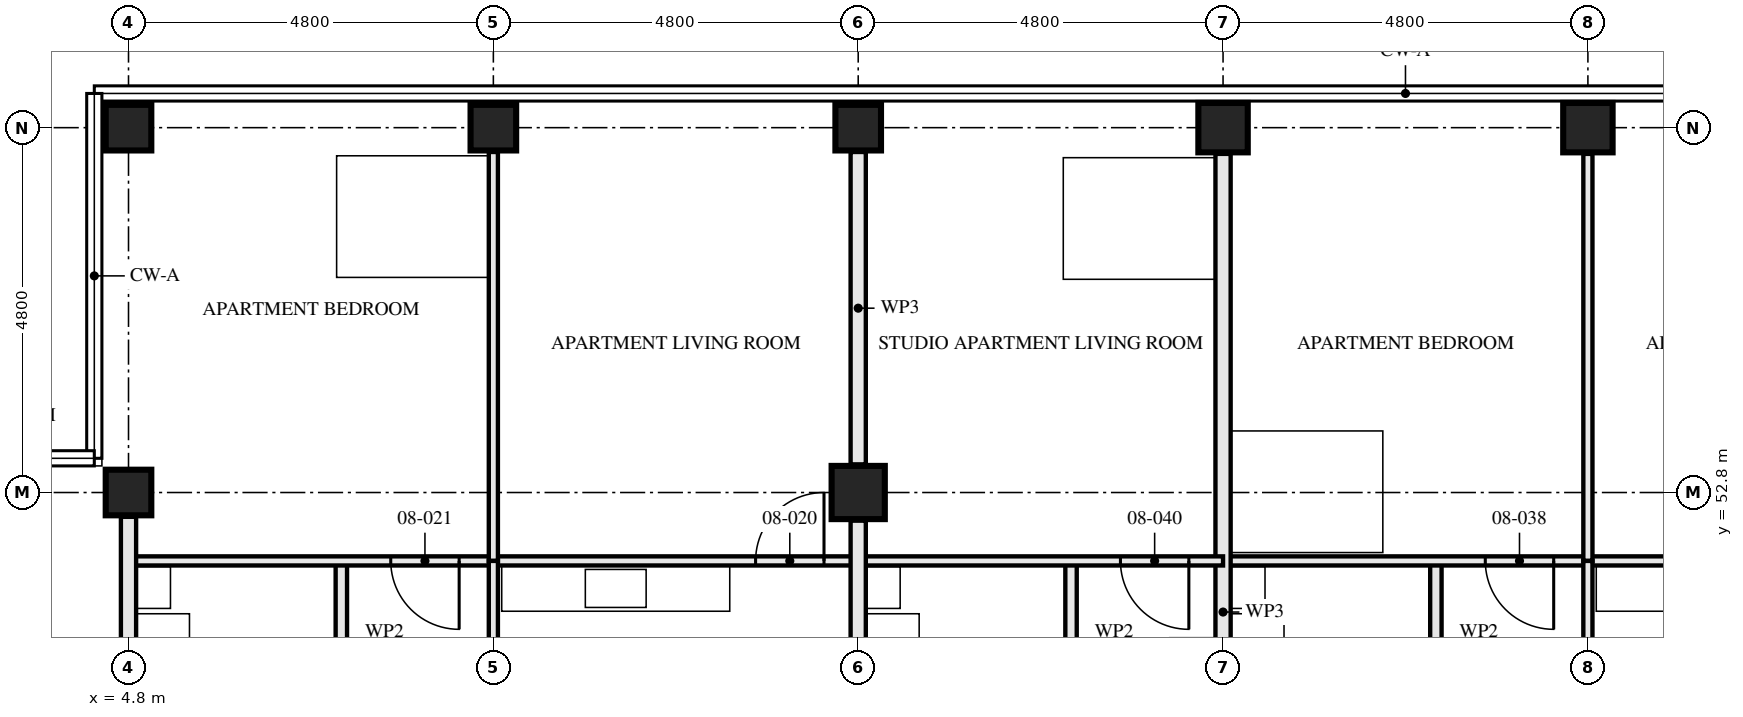
"""IFC4 building model, lengths in metres.
Left out: names, types, materials, properties, quantities, classifications, styles, units other than length and angle.
Written with IfcOpenShell. Run it as: python <this file> out.ifc"""

import sys

from ifc_helpers import new_model, si_unit, direction, frame, frame_2d, origin, origin_2d, place, context, subcontext, project, spatial, rectangle, hollow_rectangle, extrude, element, fill, save


model = new_model("IFC4")
c1 = context("Model", 3, precision=1e-05, world=origin(), true_north=direction((0.0, 1.0)))
c2 = subcontext(c1, "Body", "Model", "MODEL_VIEW")
j1 = project(units=[si_unit("LENGTHUNIT", "METRE"), si_unit("PLANEANGLEUNIT", "RADIAN")], contexts=[c1])
p1 = place(None, origin())
s1 = spatial("IfcSite", under=j1, at=p1, CompositionType="ELEMENT")
p2 = place(p1, origin())
s2 = spatial("IfcBuilding", under=s1, at=p2, CompositionType="ELEMENT")
p3 = place(p2, frame((0.0, 0.0, 34.0)))
s3 = spatial("IfcBuildingStorey", under=s2, at=p3, CompositionType="ELEMENT", Elevation=34.0)
for number, where, z_axis, x_axis in (
    (1, (4.8, 52.8, 0.0), (0.0, 0.0, 1.0), (0.0, 1.0, 0.0)),
    (2, (4.8, 57.6, 0.0), (0.0, 0.0, 1.0), (0.0, 1.0, 0.0)),
    (3, (9.6, 57.6, 0.0), (0.0, 0.0, 1.0), (0.0, 1.0, 0.0)),
):
    element("IfcColumn", number, at=place(p3, frame(where, z_axis=z_axis, x_axis=x_axis)), inside=s3, PredefinedType="COLUMN", context=c2, shape_type="SweptSolid", body=[
        extrude(hollow_rectangle(XDim=0.6, YDim=0.6, WallThickness=0.08, at=origin_2d()), origin(), (0.0, 0.0, 1.0), 3.5),
    ])
p4 = place(p3, frame((14.4, 52.8, 0.0), z_axis=(0.0, 0.0, 1.0), x_axis=(1.0, 0.0, 0.0)))
e4 = element("IfcColumn", 4, at=p4, inside=s3, PredefinedType="COLUMN", context=c2, shape_type="SweptSolid", body=[
    extrude(hollow_rectangle(XDim=0.7, YDim=0.7, WallThickness=0.06, at=origin_2d()), origin(), (0.0, 0.0, 1.0), 3.5),
])
p5 = place(p3, frame((14.4, 57.6, 0.0), z_axis=(0.0, 0.0, 1.0), x_axis=(0.0, 1.0, 0.0)))
e5 = element("IfcColumn", 5, at=p5, inside=s3, PredefinedType="COLUMN", context=c2, shape_type="SweptSolid", body=[
    extrude(hollow_rectangle(XDim=0.6, YDim=0.6, WallThickness=0.08, at=origin_2d()), origin(), (0.0, 0.0, 1.0), 3.5),
])
for number, where, z_axis, x_axis in (
    (6, (19.2, 57.6, 0.0), (0.0, 0.0, 1.0), (0.0, 1.0, 0.0)),
    (7, (24.0, 57.6, 0.0), (0.0, 0.0, 1.0), (0.0, 1.0, 0.0)),
):
    element("IfcColumn", number, at=place(p3, frame(where, z_axis=z_axis, x_axis=x_axis)), inside=s3, PredefinedType="COLUMN", context=c2, shape_type="SweptSolid", body=[
        extrude(hollow_rectangle(XDim=0.65, YDim=0.65, WallThickness=0.08, at=origin_2d()), origin(), (0.0, 0.0, 1.0), 3.5),
    ])
p6 = place(p3, frame((7.6, 51.9, 0.0), z_axis=(0.0, 0.0, 1.0), x_axis=(0.0, -1.0, 0.0)))
e8 = element("IfcWall", 8, at=p6, inside=s3, PredefinedType="PARTITIONING", context=c2, shape_type="SweptSolid", body=[
    extrude(rectangle(XDim=3.0, YDim=0.15, at=frame_2d((1.5, 0.0))), origin(), (0.0, 0.0, 1.0), 3.33),
])
p7 = place(p6, frame((1.05, 0.0, 0.0)))
e9 = element("IfcOpeningElement", 9, at=p7, cuts=e8, PredefinedType="OPENING", context=c2, shape_type="SweptSolid", body=[
    extrude(rectangle(XDim=0.9, YDim=2.1, at=frame_2d((0.45, 1.05))), frame((0.0, 0.085, 0.0), z_axis=(0.0, -1.0, 0.0), x_axis=(1.0, 0.0, 0.0)), (0.0, 0.0, 1.0), 0.171),
])
p8 = place(p3, frame((9.6, 51.9, 0.0), z_axis=(0.0, 0.0, 1.0), x_axis=(0.0, -1.0, 0.0)))
e10 = element("IfcWall", 10, at=p8, inside=s3, PredefinedType="PARTITIONING", context=c2, shape_type="SweptSolid", body=[
    extrude(rectangle(XDim=6.75, YDim=0.12, at=frame_2d((3.375, 0.0))), origin(), (0.0, 0.0, 1.0), 2.55),
])
p9 = place(p8, frame((2.925, 0.0, 0.0)))
e11 = element("IfcOpeningElement", 11, at=p9, cuts=e10, PredefinedType="OPENING", context=c2, shape_type="SweptSolid", body=[
    extrude(rectangle(XDim=0.9, YDim=2.1, at=frame_2d((0.45, 1.05))), frame((0.0, 0.071, 0.0), z_axis=(0.0, -1.0, 0.0), x_axis=(1.0, 0.0, 0.0)), (0.0, 0.0, 1.0), 0.141),
])
p10 = place(p3, frame((14.4, 51.9, 0.0), z_axis=(0.0, 0.0, 1.0), x_axis=(-1.0, 0.0, 0.0)))
e12 = element("IfcWall", 12, at=p10, inside=s3, PredefinedType="PARTITIONING", context=c2, shape_type="SweptSolid", body=[
    extrude(rectangle(XDim=4.8, YDim=0.12, at=frame_2d((2.4, 0.0))), origin(), (0.0, 0.0, 1.0), 3.33),
])
p11 = place(p10, frame((0.45, 0.0, 0.0)))
e13 = element("IfcOpeningElement", 13, at=p11, cuts=e12, PredefinedType="OPENING", context=c2, shape_type="SweptSolid", body=[
    extrude(rectangle(XDim=0.9, YDim=2.1, at=frame_2d((0.45, 1.05))), frame((0.0, 0.071, 0.0), z_axis=(0.0, -1.0, 0.0), x_axis=(1.0, 0.0, 0.0)), (0.0, 0.0, 1.0), 0.141),
])
p12 = place(p3, frame((9.6, 51.9, 0.0), z_axis=(0.0, 0.0, 1.0), x_axis=(-1.0, 0.0, 0.0)))
e14 = element("IfcWall", 14, at=p12, inside=s3, PredefinedType="PARTITIONING", context=c2, shape_type="SweptSolid", body=[
    extrude(rectangle(XDim=4.8, YDim=0.12, at=frame_2d((2.4, 0.0))), origin(), (0.0, 0.0, 1.0), 3.33),
])
p13 = place(p12, frame((0.45, 0.0, 0.0)))
e15 = element("IfcOpeningElement", 15, at=p13, cuts=e14, PredefinedType="OPENING", context=c2, shape_type="SweptSolid", body=[
    extrude(rectangle(XDim=0.9, YDim=2.1, at=frame_2d((0.45, 1.05))), frame((0.0, 0.071, 0.0), z_axis=(0.0, -1.0, 0.0), x_axis=(1.0, 0.0, 0.0)), (0.0, 0.0, 1.0), 0.141),
])
p14 = place(p3, frame((9.6, 57.28, 0.0), z_axis=(0.0, 0.0, 1.0), x_axis=(0.0, -1.0, 0.0)))
e16 = element("IfcWall", 16, at=p14, inside=s3, PredefinedType="PARTITIONING", context=c2, shape_type="SweptSolid", body=[
    extrude(rectangle(XDim=5.38, YDim=0.12, at=frame_2d((2.69, 0.0))), origin(), (0.0, 0.0, 1.0), 2.55),
])
p15 = place(p3, frame((4.8, 52.48, 0.0), z_axis=(0.0, 0.0, 1.0), x_axis=(0.0, -1.0, 0.0)))
e17 = element("IfcWall", 17, at=p15, inside=s3, PredefinedType="PARTITIONING", context=c2, shape_type="SweptSolid", body=[
    extrude(rectangle(XDim=7.28, YDim=0.2, at=frame_2d((3.64, 0.0))), origin(), (0.0, 0.0, 1.0), 2.55),
])
p16 = place(p3, frame((22.0, 51.9, 0.0), z_axis=(0.0, 0.0, 1.0), x_axis=(0.0, -1.0, 0.0)))
e18 = element("IfcWall", 18, at=p16, inside=s3, PredefinedType="PARTITIONING", context=c2, shape_type="SweptSolid", body=[
    extrude(rectangle(XDim=3.0, YDim=0.15, at=frame_2d((1.5, 0.0))), origin(), (0.0, 0.0, 1.0), 3.33),
])
p17 = place(p16, frame((1.05, 0.0, 0.0)))
e19 = element("IfcOpeningElement", 19, at=p17, cuts=e18, PredefinedType="OPENING", context=c2, shape_type="SweptSolid", body=[
    extrude(rectangle(XDim=0.9, YDim=2.1, at=frame_2d((0.45, 1.05))), frame((0.0, 0.085, 0.0), z_axis=(0.0, -1.0, 0.0), x_axis=(1.0, 0.0, 0.0)), (0.0, 0.0, 1.0), 0.171),
])
p18 = place(p3, frame((24.0, 51.9, 0.0), z_axis=(0.0, 0.0, 1.0), x_axis=(0.0, -1.0, 0.0)))
e20 = element("IfcWall", 20, at=p18, inside=s3, PredefinedType="PARTITIONING", context=c2, shape_type="SweptSolid", body=[
    extrude(rectangle(XDim=6.75, YDim=0.12, at=frame_2d((3.375, 0.0))), origin(), (0.0, 0.0, 1.0), 2.55),
])
p19 = place(p18, frame((2.925, 0.0, 0.0)))
e21 = element("IfcOpeningElement", 21, at=p19, cuts=e20, PredefinedType="OPENING", context=c2, shape_type="SweptSolid", body=[
    extrude(rectangle(XDim=0.9, YDim=2.1, at=frame_2d((0.45, 1.05))), frame((0.0, 0.071, 0.0), z_axis=(0.0, -1.0, 0.0), x_axis=(1.0, 0.0, 0.0)), (0.0, 0.0, 1.0), 0.141),
])
p20 = place(p3, frame((28.8, 51.9, 0.0), z_axis=(0.0, 0.0, 1.0), x_axis=(-1.0, 0.0, 0.0)))
e22 = element("IfcWall", 22, at=p20, inside=s3, PredefinedType="PARTITIONING", context=c2, shape_type="SweptSolid", body=[
    extrude(rectangle(XDim=4.8, YDim=0.12, at=frame_2d((2.4, 0.0))), origin(), (0.0, 0.0, 1.0), 3.33),
])
p21 = place(p20, frame((0.45, 0.0, 0.0)))
e23 = element("IfcOpeningElement", 23, at=p21, cuts=e22, PredefinedType="OPENING", context=c2, shape_type="SweptSolid", body=[
    extrude(rectangle(XDim=0.9, YDim=2.1, at=frame_2d((0.45, 1.05))), frame((0.0, 0.071, 0.0), z_axis=(0.0, -1.0, 0.0), x_axis=(1.0, 0.0, 0.0)), (0.0, 0.0, 1.0), 0.141),
])
p22 = place(p3, frame((24.0, 51.9, 0.0), z_axis=(0.0, 0.0, 1.0), x_axis=(-1.0, 0.0, 0.0)))
e24 = element("IfcWall", 24, at=p22, inside=s3, PredefinedType="PARTITIONING", context=c2, shape_type="SweptSolid", body=[
    extrude(rectangle(XDim=4.8, YDim=0.12, at=frame_2d((2.4, 0.0))), origin(), (0.0, 0.0, 1.0), 3.33),
])
p23 = place(p22, frame((0.45, 0.0, 0.0)))
e25 = element("IfcOpeningElement", 25, at=p23, cuts=e24, PredefinedType="OPENING", context=c2, shape_type="SweptSolid", body=[
    extrude(rectangle(XDim=0.9, YDim=2.1, at=frame_2d((0.45, 1.05))), frame((0.0, 0.071, 0.0), z_axis=(0.0, -1.0, 0.0), x_axis=(1.0, 0.0, 0.0)), (0.0, 0.0, 1.0), 0.141),
])
p24 = place(p3, frame((24.0, 57.255, 0.0), z_axis=(0.0, 0.0, 1.0), x_axis=(0.0, -1.0, 0.0)))
e26 = element("IfcWall", 26, at=p24, inside=s3, PredefinedType="PARTITIONING", context=c2, shape_type="SweptSolid", body=[
    extrude(rectangle(XDim=5.355, YDim=0.12, at=frame_2d((2.677, 0.0))), origin(), (0.0, 0.0, 1.0), 2.55),
])
p25 = place(p3, frame((19.2, 57.255, 0.0), z_axis=(0.0, 0.0, 1.0), x_axis=(0.0, -1.0, 0.0)))
e27 = element("IfcWall", 27, at=p25, inside=s3, PredefinedType="PARTITIONING", context=c2, shape_type="SweptSolid", body=[
    extrude(rectangle(XDim=12.055, YDim=0.2, at=frame_2d((6.027, 0.0))), origin(), (0.0, 0.0, 1.0), 2.55),
])
p26 = place(p3, frame((17.2, 51.9, 0.0), z_axis=(0.0, 0.0, 1.0), x_axis=(0.0, -1.0, 0.0)))
e28 = element("IfcWall", 28, at=p26, inside=s3, PredefinedType="PARTITIONING", context=c2, shape_type="SweptSolid", body=[
    extrude(rectangle(XDim=3.0, YDim=0.15, at=frame_2d((1.5, 0.0))), origin(), (0.0, 0.0, 1.0), 3.33),
])
p27 = place(p26, frame((1.05, 0.0, 0.0)))
e29 = element("IfcOpeningElement", 29, at=p27, cuts=e28, PredefinedType="OPENING", context=c2, shape_type="SweptSolid", body=[
    extrude(rectangle(XDim=0.9, YDim=2.1, at=frame_2d((0.45, 1.05))), frame((0.0, 0.085, 0.0), z_axis=(0.0, -1.0, 0.0), x_axis=(1.0, 0.0, 0.0)), (0.0, 0.0, 1.0), 0.171),
])
p28 = place(p3, frame((19.2, 51.9, 0.0), z_axis=(0.0, 0.0, 1.0), x_axis=(-1.0, 0.0, 0.0)))
e30 = element("IfcWall", 30, at=p28, inside=s3, PredefinedType="PARTITIONING", context=c2, shape_type="SweptSolid", body=[
    extrude(rectangle(XDim=4.8, YDim=0.12, at=frame_2d((2.4, 0.0))), origin(), (0.0, 0.0, 1.0), 3.33),
])
p29 = place(p28, frame((0.45, 0.0, 0.0)))
e31 = element("IfcOpeningElement", 31, at=p29, cuts=e30, PredefinedType="OPENING", context=c2, shape_type="SweptSolid", body=[
    extrude(rectangle(XDim=0.9, YDim=2.1, at=frame_2d((0.45, 1.05))), frame((0.0, 0.071, 0.0), z_axis=(0.0, -1.0, 0.0), x_axis=(1.0, 0.0, 0.0)), (0.0, 0.0, 1.0), 0.141),
])
p30 = place(p3, frame((14.4, 48.37, 0.0), z_axis=(0.0, 0.0, 1.0), x_axis=(0.0, 1.0, 0.0)))
e32 = element("IfcWall", 32, at=p30, inside=s3, PredefinedType="PARTITIONING", context=c2, shape_type="SweptSolid", body=[
    extrude(rectangle(XDim=4.06, YDim=0.2, at=frame_2d((2.03, 0.0))), origin(), (0.0, 0.0, 1.0), 2.32),
])
p31 = place(p3, frame((14.4, 53.17, 0.0), z_axis=(0.0, 0.0, 1.0), x_axis=(0.0, 1.0, 0.0)))
e33 = element("IfcWall", 33, at=p31, inside=s3, PredefinedType="PARTITIONING", context=c2, shape_type="SweptSolid", body=[
    extrude(rectangle(XDim=4.11, YDim=0.2, at=frame_2d((2.055, 0.0))), origin(), (0.0, 0.0, 1.0), 2.32),
])
p32 = place(p11, frame((0.9, 0.0, 0.0), z_axis=(0.0, 0.0, 1.0), x_axis=(-1.0, 0.0, 0.0)))
e34 = element("IfcDoor", 34, at=p32, inside=s3, OperationType="SINGLE_SWING_LEFT", PredefinedType="DOOR", context=c2, shape_type="SweptSolid", body=[
    extrude(rectangle(XDim=0.9, YDim=2.1, at=frame_2d((0.45, 1.05))), frame((0.0, 0.022, 0.0), z_axis=(0.0, -1.0, 0.0), x_axis=(1.0, 0.0, 0.0)), (0.0, 0.0, 1.0), 0.044),
])
fill(e13, e34)
p33 = place(p13, origin())
e35 = element("IfcDoor", 35, at=p33, inside=s3, OperationType="SINGLE_SWING_RIGHT", PredefinedType="DOOR", context=c2, shape_type="SweptSolid", body=[
    extrude(rectangle(XDim=0.9, YDim=2.1, at=frame_2d((0.45, 1.05))), frame((0.0, 0.022, 0.0), z_axis=(0.0, -1.0, 0.0), x_axis=(1.0, 0.0, 0.0)), (0.0, 0.0, 1.0), 0.044),
])
fill(e15, e35)
p34 = place(p23, origin())
e36 = element("IfcDoor", 36, at=p34, inside=s3, OperationType="SINGLE_SWING_RIGHT", PredefinedType="DOOR", context=c2, shape_type="SweptSolid", body=[
    extrude(rectangle(XDim=0.9, YDim=2.1, at=frame_2d((0.45, 1.05))), frame((0.0, 0.022, 0.0), z_axis=(0.0, -1.0, 0.0), x_axis=(1.0, 0.0, 0.0)), (0.0, 0.0, 1.0), 0.044),
])
fill(e25, e36)
p35 = place(p29, origin())
e37 = element("IfcDoor", 37, at=p35, inside=s3, OperationType="SINGLE_SWING_RIGHT", PredefinedType="DOOR", context=c2, shape_type="SweptSolid", body=[
    extrude(rectangle(XDim=0.9, YDim=2.1, at=frame_2d((0.45, 1.05))), frame((0.0, 0.022, 0.0), z_axis=(0.0, -1.0, 0.0), x_axis=(1.0, 0.0, 0.0)), (0.0, 0.0, 1.0), 0.044),
])
fill(e31, e37)
save(model, sys.argv[1])
